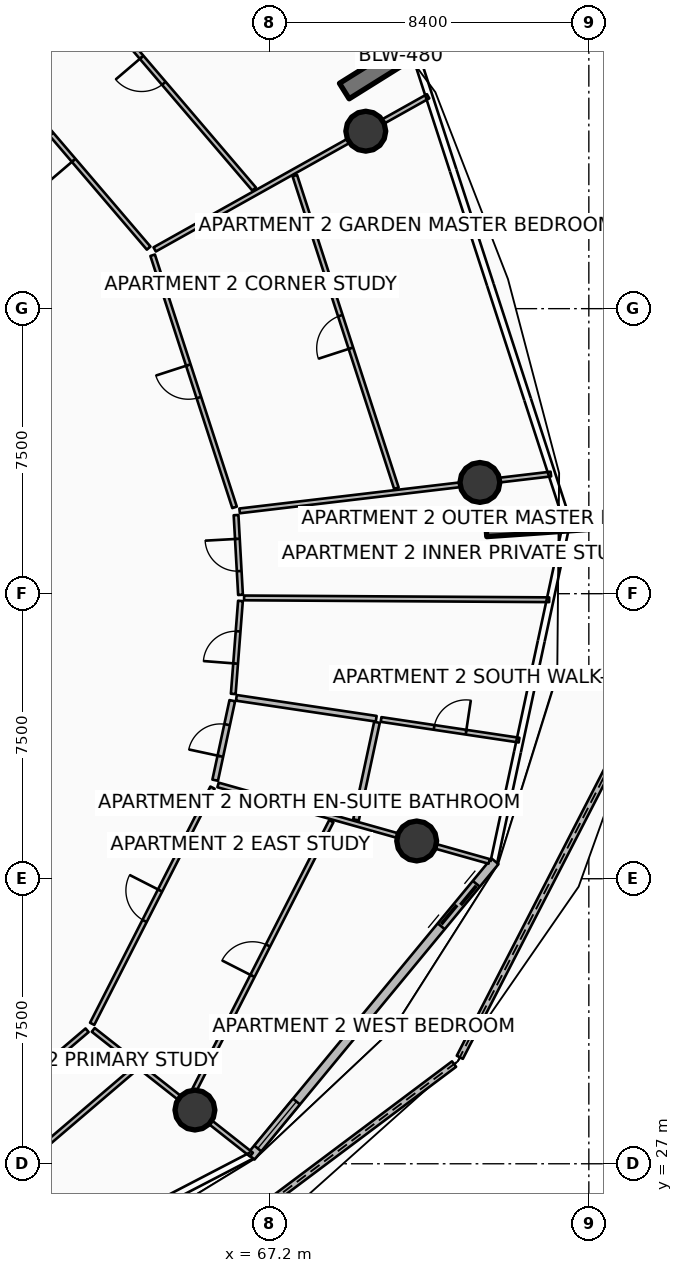
"""IFC4 building model, lengths in metres.
Left out: names, types, materials, properties, quantities, classifications, styles, units other than length and angle.
Written with IfcOpenShell. Run it as: python <this file> out.ifc"""

import sys

from ifc_helpers import new_model, si_unit, direction, frame, frame_2d, origin, origin_2d, place, context, subcontext, project, spatial, polyline, rectangle, circle, outline, extrude, element, fill, save


model = new_model("IFC4")
c1 = context("Model", 3, precision=1e-05, world=origin(), true_north=direction((0.0, 1.0)))
c2 = subcontext(c1, "Body", "Model", "MODEL_VIEW")
j1 = project(units=[si_unit("LENGTHUNIT", "METRE"), si_unit("PLANEANGLEUNIT", "RADIAN")], contexts=[c1])
p1 = place(None, origin())
s1 = spatial("IfcSite", under=j1, at=p1, CompositionType="ELEMENT")
p2 = place(p1, origin())
s2 = spatial("IfcBuilding", under=s1, at=p2, CompositionType="ELEMENT")
p3 = place(p2, frame((0.0, 0.0, 146.55)))
s3 = spatial("IfcBuildingStorey", under=s2, at=p3, CompositionType="ELEMENT", Elevation=146.55)
for number, where, z_axis, x_axis in (
    (1, (69.165, 55.226, 0.0), (0.0, 0.0, 1.0), (0.848, 0.53, 0.0)),
    (2, (72.897, 43.741, 0.0), (0.0, 0.0, 1.0), (0.998, 0.07, 0.0)),
):
    element("IfcWall", number, at=place(p3, frame(where, z_axis=z_axis, x_axis=x_axis)), inside=s3, PredefinedType="SOLIDWALL", context=c2, shape_type="SweptSolid", body=[
        extrude(rectangle(XDim=3.5, YDim=0.48, at=frame_2d((1.75, 0.0))), origin(), (0.0, 0.0, 1.0), 3.75),
    ])
for number, where, z_axis, x_axis in (
    (3, (69.73, 54.169, 0.0), (0.0, 0.0, 1.0), (1.0, 0.0, 0.0)),
    (4, (65.234, 28.414, 0.0), (0.0, 0.0, 1.0), (1.0, 0.0, 0.0)),
    (5, (71.07, 35.494, 0.0), (0.0, 0.0, 1.0), (1.0, 0.0, 0.0)),
    (6, (72.733, 44.927, 0.0), (0.0, 0.0, 1.0), (1.0, 0.0, 0.0)),
):
    element("IfcColumn", number, at=place(p3, frame(where, z_axis=z_axis, x_axis=x_axis)), inside=s3, PredefinedType="COLUMN", context=c2, shape_type="SweptSolid", body=[
        extrude(circle(Radius=0.525, at=origin_2d()), origin(), (0.0, 0.0, 1.0), 3.5),
    ])
p4 = place(p3, frame((63.954, 23.55, 0.0), z_axis=(0.0, 0.0, 1.0), x_axis=(0.800078127259, 0.599895816189, 0.0)))
e7 = element("IfcWall", 7, at=p4, inside=s3, PredefinedType="PARAPET", context=c2, shape_type="SweptSolid", body=[
    extrude(outline(polyline([(0.0, 0.0), (10.124, 0.0), (10.124, 1.348), (5.062, 1.182), (0.0, 1.12), (0.0, 0.0)])), frame((0.0, 0.09, 0.0), z_axis=(0.0, -1.0, 0.0), x_axis=(1.0, 0.0, 0.0)), (0.0, 0.0, 1.0), 0.18),
])
p5 = place(p3, frame((72.204, 29.802, 0.0), z_axis=(0.0, 0.0, 1.0), x_axis=(0.457378798552, 0.88927196888, 0.0)))
e8 = element("IfcWall", 8, at=p5, inside=s3, PredefinedType="PARAPET", context=c2, shape_type="SweptSolid", body=[
    extrude(outline(polyline([(0.0, 0.0), (10.93, 0.0), (10.93, 1.747), (5.465, 1.562), (0.0, 1.348), (0.0, 0.0)])), frame((0.0, 0.09, 0.0), z_axis=(0.0, -1.0, 0.0), x_axis=(1.0, 0.0, 0.0)), (0.0, 0.0, 1.0), 0.18),
])
p6 = place(p3, frame((66.709, 27.187, 0.0), z_axis=(0.0, 0.0, 1.0), x_axis=(0.636771922292, 0.77105221547, 0.0)))
e9 = element("IfcWall", 9, at=p6, inside=s3, PredefinedType="SOLIDWALL", context=c2, shape_type="SweptSolid", body=[
    extrude(rectangle(XDim=10.082, YDim=0.24, at=frame_2d((5.041, 0.0))), origin(), (0.0, 0.0, 1.0), 2.45),
])
p7 = place(p6, frame((7.862, 0.0, 0.0)))
e10 = element("IfcOpeningElement", 10, at=p7, cuts=e9, PredefinedType="OPENING", context=c2, shape_type="SweptSolid", body=[
    extrude(rectangle(XDim=1.45, YDim=2.15, at=frame_2d((0.725, 1.075))), frame((0.0, 0.13, 0.0), z_axis=(0.0, -1.0, 0.0), x_axis=(1.0, 0.0, 0.0)), (0.0, 0.0, 1.0), 0.26),
])
p8 = place(p6, frame((0.28, 0.0, 0.65)))
e11 = element("IfcOpeningElement", 11, at=p8, cuts=e9, PredefinedType="OPENING", context=c2, shape_type="SweptSolid", body=[
    extrude(rectangle(XDim=1.6, YDim=1.5, at=frame_2d((0.8, 0.75))), frame((0.0, 0.13, 0.0), z_axis=(0.0, -1.0, 0.0), x_axis=(1.0, 0.0, 0.0)), (0.0, 0.0, 1.0), 0.26),
])
p9 = place(p3, frame((57.093, 25.983, 0.0), z_axis=(0.0, 0.0, 1.0), x_axis=(0.76040680935, 0.649447060425, 0.0)))
e12 = element("IfcWall", 12, at=p9, inside=s3, PredefinedType="PARTITIONING", context=c2, shape_type="SweptSolid", body=[
    extrude(rectangle(XDim=6.975, YDim=0.125, at=frame_2d((3.487, 0.0))), origin(), (0.0, 0.0, 1.0), 2.94),
])
p10 = place(p9, frame((3.037, 0.0, 0.0)))
e13 = element("IfcOpeningElement", 13, at=p10, cuts=e12, PredefinedType="OPENING", context=c2, shape_type="SweptSolid", body=[
    extrude(rectangle(XDim=0.9, YDim=2.08, at=frame_2d((0.45, 1.04))), frame((0.0, 0.073, 0.0), z_axis=(0.0, -1.0, 0.0), x_axis=(1.0, 0.0, 0.0)), (0.0, 0.0, 1.0), 0.145),
])
p11 = place(p3, frame((57.882, 24.574, 0.0), z_axis=(0.0, 0.0, 1.0), x_axis=(0.760417937401, 0.649434030891, 0.0)))
e14 = element("IfcWall", 14, at=p11, inside=s3, PredefinedType="PARTITIONING", context=c2, shape_type="SweptSolid", body=[
    extrude(rectangle(XDim=7.605, YDim=0.125, at=frame_2d((3.802, 0.0))), origin(), (0.0, 0.0, 1.0), 2.94),
])
p12 = place(p11, frame((3.352, 0.0, 0.0)))
e15 = element("IfcOpeningElement", 15, at=p12, cuts=e14, PredefinedType="OPENING", context=c2, shape_type="SweptSolid", body=[
    extrude(rectangle(XDim=0.9, YDim=2.08, at=frame_2d((0.45, 1.04))), frame((0.0, 0.073, 0.0), z_axis=(0.0, -1.0, 0.0), x_axis=(1.0, 0.0, 0.0)), (0.0, 0.0, 1.0), 0.145),
])
p13 = place(p3, frame((62.559, 30.523, 0.0), z_axis=(0.0, 0.0, 1.0), x_axis=(0.785319981095, -0.619090080112, 0.0)))
e16 = element("IfcWall", 16, at=p13, inside=s3, PredefinedType="PARTITIONING", context=c2, shape_type="SweptSolid", body=[
    extrude(rectangle(XDim=5.301, YDim=0.125, at=frame_2d((2.65, 0.0))), origin(), (0.0, 0.0, 1.0), 2.94),
])
p14 = place(p3, frame((62.531, 30.683, 0.0), z_axis=(0.0, 0.0, 1.0), x_axis=(0.453977694262, 0.891013048789, 0.0)))
e17 = element("IfcWall", 17, at=p14, inside=s3, PredefinedType="PARTITIONING", context=c2, shape_type="SweptSolid", body=[
    extrude(rectangle(XDim=6.974, YDim=0.125, at=frame_2d((3.487, 0.0))), origin(), (0.0, 0.0, 1.0), 2.94),
])
p15 = place(p14, frame((3.037, 0.0, 0.0)))
e18 = element("IfcOpeningElement", 18, at=p15, cuts=e17, PredefinedType="OPENING", context=c2, shape_type="SweptSolid", body=[
    extrude(rectangle(XDim=0.9, YDim=2.08, at=frame_2d((0.45, 1.04))), frame((0.0, 0.073, 0.0), z_axis=(0.0, -1.0, 0.0), x_axis=(1.0, 0.0, 0.0)), (0.0, 0.0, 1.0), 0.145),
])
p16 = place(p3, frame((65.082, 28.671, 0.0), z_axis=(0.0, 0.0, 1.0), x_axis=(0.454001657521, 0.891000838927, 0.0)))
e19 = element("IfcWall", 19, at=p16, inside=s3, PredefinedType="PARTITIONING", context=c2, shape_type="SweptSolid", body=[
    extrude(rectangle(XDim=8.242, YDim=0.125, at=frame_2d((4.121, 0.0))), origin(), (0.0, 0.0, 1.0), 2.94),
])
p17 = place(p16, frame((3.671, 0.0, 0.0)))
e20 = element("IfcOpeningElement", 20, at=p17, cuts=e19, PredefinedType="OPENING", context=c2, shape_type="SweptSolid", body=[
    extrude(rectangle(XDim=0.9, YDim=2.08, at=frame_2d((0.45, 1.04))), frame((0.0, 0.073, 0.0), z_axis=(0.0, -1.0, 0.0), x_axis=(1.0, 0.0, 0.0)), (0.0, 0.0, 1.0), 0.145),
])
p18 = place(p3, frame((65.843, 36.968, 0.0), z_axis=(0.0, 0.0, 1.0), x_axis=(0.962456736489, -0.271435131084, 0.0)))
e21 = element("IfcWall", 21, at=p18, inside=s3, PredefinedType="PARTITIONING", context=c2, shape_type="SweptSolid", body=[
    extrude(rectangle(XDim=7.412, YDim=0.125, at=frame_2d((3.706, 0.0))), origin(), (0.0, 0.0, 1.0), 2.94),
])
p19 = place(p3, frame((65.768, 37.093, 0.0), z_axis=(0.0, 0.0, 1.0), x_axis=(0.210136736931, 0.977672006243, 0.0)))
e22 = element("IfcWall", 22, at=p19, inside=s3, PredefinedType="PARTITIONING", context=c2, shape_type="SweptSolid", body=[
    extrude(rectangle(XDim=2.14, YDim=0.15, at=frame_2d((1.07, 0.0))), origin(), (0.0, 0.0, 1.0), 2.94),
])
p20 = place(p19, frame((0.645, 0.0, 0.0)))
e23 = element("IfcOpeningElement", 23, at=p20, cuts=e22, PredefinedType="OPENING", context=c2, shape_type="SweptSolid", body=[
    extrude(rectangle(XDim=0.85, YDim=2.06, at=frame_2d((0.425, 1.03))), frame((0.0, 0.085, 0.0), z_axis=(0.0, -1.0, 0.0), x_axis=(1.0, 0.0, 0.0)), (0.0, 0.0, 1.0), 0.17),
])
p21 = place(p3, frame((69.473, 36.048, 0.0), z_axis=(0.0, 0.0, 1.0), x_axis=(0.210074988051, 0.97768527625, 0.0)))
e24 = element("IfcWall", 24, at=p21, inside=s3, PredefinedType="PARTITIONING", context=c2, shape_type="SweptSolid", body=[
    extrude(rectangle(XDim=2.626, YDim=0.15, at=frame_2d((1.313, 0.0))), origin(), (0.0, 0.0, 1.0), 2.94),
])
p22 = place(p3, frame((66.325, 39.26, 0.0), z_axis=(0.0, 0.0, 1.0), x_axis=(0.988998843182, -0.147923250997, 0.0)))
e25 = element("IfcWall", 25, at=p22, inside=s3, PredefinedType="PARTITIONING", context=c2, shape_type="SweptSolid", body=[
    extrude(rectangle(XDim=3.72, YDim=0.15, at=frame_2d((1.86, 0.0))), origin(), (0.0, 0.0, 1.0), 2.94),
])
p23 = place(p3, frame((70.133, 38.69, 0.0), z_axis=(0.0, 0.0, 1.0), x_axis=(0.989002592366, -0.147898182183, 0.0)))
e26 = element("IfcWall", 26, at=p23, inside=s3, PredefinedType="PARTITIONING", context=c2, shape_type="SweptSolid", body=[
    extrude(rectangle(XDim=3.671, YDim=0.125, at=frame_2d((1.835, 0.0))), origin(), (0.0, 0.0, 1.0), 2.94),
])
p24 = place(p23, frame((1.411, 0.0, 0.0)))
e27 = element("IfcOpeningElement", 27, at=p24, cuts=e26, PredefinedType="OPENING", context=c2, shape_type="SweptSolid", body=[
    extrude(rectangle(XDim=0.85, YDim=2.06, at=frame_2d((0.425, 1.03))), frame((0.0, 0.073, 0.0), z_axis=(0.0, -1.0, 0.0), x_axis=(1.0, 0.0, 0.0)), (0.0, 0.0, 1.0), 0.145),
])
p25 = place(p3, frame((66.529, 41.889, 0.0), z_axis=(0.0, 0.0, 1.0), x_axis=(0.999982052634, -0.00599119444, 0.0)))
e28 = element("IfcWall", 28, at=p25, inside=s3, PredefinedType="PARTITIONING", context=c2, shape_type="SweptSolid", body=[
    extrude(rectangle(XDim=8.028, YDim=0.125, at=frame_2d((4.014, 0.0))), origin(), (0.0, 0.0, 1.0), 2.94),
])
p26 = place(p3, frame((66.243, 39.363, 0.0), z_axis=(0.0, 0.0, 1.0), x_axis=(0.077198584258, 0.99701573638, 0.0)))
e29 = element("IfcWall", 29, at=p26, inside=s3, PredefinedType="PARTITIONING", context=c2, shape_type="SweptSolid", body=[
    extrude(rectangle(XDim=2.454, YDim=0.125, at=frame_2d((1.227, 0.0))), origin(), (0.0, 0.0, 1.0), 2.94),
])
p27 = place(p26, frame((0.802, 0.0, 0.0)))
e30 = element("IfcOpeningElement", 30, at=p27, cuts=e29, PredefinedType="OPENING", context=c2, shape_type="SweptSolid", body=[
    extrude(rectangle(XDim=0.85, YDim=2.06, at=frame_2d((0.425, 1.03))), frame((0.0, 0.073, 0.0), z_axis=(0.0, -1.0, 0.0), x_axis=(1.0, 0.0, 0.0)), (0.0, 0.0, 1.0), 0.145),
])
p28 = place(p3, frame((66.434, 41.969, 0.0), z_axis=(0.0, 0.0, 1.0), x_axis=(-0.055766005986, 0.998443865511, 0.0)))
e31 = element("IfcWall", 31, at=p28, inside=s3, PredefinedType="PARTITIONING", context=c2, shape_type="SweptSolid", body=[
    extrude(rectangle(XDim=2.101, YDim=0.125, at=frame_2d((1.051, 0.0))), origin(), (0.0, 0.0, 1.0), 2.94),
])
p29 = place(p28, frame((0.626, 0.0, 0.0)))
e32 = element("IfcOpeningElement", 32, at=p29, cuts=e31, PredefinedType="OPENING", context=c2, shape_type="SweptSolid", body=[
    extrude(rectangle(XDim=0.85, YDim=2.06, at=frame_2d((0.425, 1.03))), frame((0.0, 0.073, 0.0), z_axis=(0.0, -1.0, 0.0), x_axis=(1.0, 0.0, 0.0)), (0.0, 0.0, 1.0), 0.145),
])
p30 = place(p3, frame((66.41, 44.179, 0.0), z_axis=(0.0, 0.0, 1.0), x_axis=(0.993070354128, 0.117521367213, 0.0)))
e33 = element("IfcWall", 33, at=p30, inside=s3, PredefinedType="PARTITIONING", context=c2, shape_type="SweptSolid", body=[
    extrude(rectangle(XDim=8.247, YDim=0.125, at=frame_2d((4.124, 0.0))), origin(), (0.0, 0.0, 1.0), 2.94),
])
p31 = place(p3, frame((66.277, 44.272, 0.0), z_axis=(0.0, 0.0, 1.0), x_axis=(-0.308993461661, 0.951064162215, 0.0)))
e34 = element("IfcWall", 34, at=p31, inside=s3, PredefinedType="PARTITIONING", context=c2, shape_type="SweptSolid", body=[
    extrude(rectangle(XDim=6.974, YDim=0.125, at=frame_2d((3.487, 0.0))), origin(), (0.0, 0.0, 1.0), 2.94),
])
p32 = place(p31, frame((3.037, 0.0, 0.0)))
e35 = element("IfcOpeningElement", 35, at=p32, cuts=e34, PredefinedType="OPENING", context=c2, shape_type="SweptSolid", body=[
    extrude(rectangle(XDim=0.9, YDim=2.08, at=frame_2d((0.45, 1.04))), frame((0.0, 0.073, 0.0), z_axis=(0.0, -1.0, 0.0), x_axis=(1.0, 0.0, 0.0)), (0.0, 0.0, 1.0), 0.145),
])
p33 = place(p3, frame((70.535, 44.776, 0.0), z_axis=(0.0, 0.0, 1.0), x_axis=(-0.309002443549, 0.951061244022, 0.0)))
e36 = element("IfcWall", 36, at=p33, inside=s3, PredefinedType="PARTITIONING", context=c2, shape_type="SweptSolid", body=[
    extrude(rectangle(XDim=8.647, YDim=0.125, at=frame_2d((4.324, 0.0))), origin(), (0.0, 0.0, 1.0), 2.94),
])
p34 = place(p33, frame((3.874, 0.0, 0.0)))
e37 = element("IfcOpeningElement", 37, at=p34, cuts=e36, PredefinedType="OPENING", context=c2, shape_type="SweptSolid", body=[
    extrude(rectangle(XDim=0.9, YDim=2.08, at=frame_2d((0.45, 1.04))), frame((0.0, 0.073, 0.0), z_axis=(0.0, -1.0, 0.0), x_axis=(1.0, 0.0, 0.0)), (0.0, 0.0, 1.0), 0.145),
])
p35 = place(p3, frame((64.175, 51.059, 0.0), z_axis=(0.0, 0.0, 1.0), x_axis=(0.872491881101, 0.488628608877, 0.0)))
e38 = element("IfcWall", 38, at=p35, inside=s3, PredefinedType="PARTITIONING", context=c2, shape_type="SweptSolid", body=[
    extrude(rectangle(XDim=8.247, YDim=0.125, at=frame_2d((4.124, 0.0))), origin(), (0.0, 0.0, 1.0), 2.94),
])
p36 = place(p3, frame((64.017, 51.093, 0.0), z_axis=(0.0, 0.0, 1.0), x_axis=(-0.649447060425, 0.76040680935, 0.0)))
e39 = element("IfcWall", 39, at=p36, inside=s3, PredefinedType="PARTITIONING", context=c2, shape_type="SweptSolid", body=[
    extrude(rectangle(XDim=6.975, YDim=0.125, at=frame_2d((3.487, 0.0))), origin(), (0.0, 0.0, 1.0), 2.94),
])
p37 = place(p36, frame((3.037, 0.0, 0.0)))
e40 = element("IfcOpeningElement", 40, at=p37, cuts=e39, PredefinedType="OPENING", context=c2, shape_type="SweptSolid", body=[
    extrude(rectangle(XDim=0.9, YDim=2.08, at=frame_2d((0.45, 1.04))), frame((0.0, 0.073, 0.0), z_axis=(0.0, -1.0, 0.0), x_axis=(1.0, 0.0, 0.0)), (0.0, 0.0, 1.0), 0.145),
])
p38 = place(p3, frame((66.792, 52.648, 0.0), z_axis=(0.0, 0.0, 1.0), x_axis=(-0.649446834215, 0.76040700255, 0.0)))
e41 = element("IfcWall", 41, at=p38, inside=s3, PredefinedType="PARTITIONING", context=c2, shape_type="SweptSolid", body=[
    extrude(rectangle(XDim=8.216, YDim=0.125, at=frame_2d((4.108, 0.0))), origin(), (0.0, 0.0, 1.0), 2.94),
])
p39 = place(p38, frame((3.658, 0.0, 0.0)))
e42 = element("IfcOpeningElement", 42, at=p39, cuts=e41, PredefinedType="OPENING", context=c2, shape_type="SweptSolid", body=[
    extrude(rectangle(XDim=0.9, YDim=2.08, at=frame_2d((0.45, 1.04))), frame((0.0, 0.073, 0.0), z_axis=(0.0, -1.0, 0.0), x_axis=(1.0, 0.0, 0.0)), (0.0, 0.0, 1.0), 0.145),
])
p40 = place(p7, origin())
e43 = element("IfcDoor", 43, at=p40, inside=s3, OperationType="DOUBLE_DOOR_SLIDING", PredefinedType="DOOR", context=c2, shape_type="SweptSolid", body=[
    extrude(rectangle(XDim=1.45, YDim=2.15, at=frame_2d((0.725, 1.075))), frame((0.0, 0.025, 0.0), z_axis=(0.0, -1.0, 0.0), x_axis=(1.0, 0.0, 0.0)), (0.0, 0.0, 1.0), 0.05),
])
fill(e10, e43)
p41 = place(p8, origin())
e44 = element("IfcWindow", 44, at=p41, inside=s3, PartitioningType="SINGLE_PANEL", PredefinedType="WINDOW", context=c2, shape_type="SweptSolid", body=[
    extrude(rectangle(XDim=1.6, YDim=1.5, at=frame_2d((0.8, 0.75))), frame((0.0, 0.03, 0.0), z_axis=(0.0, -1.0, 0.0), x_axis=(1.0, 0.0, 0.0)), (0.0, 0.0, 1.0), 0.06),
])
fill(e11, e44)
p42 = place(p15, origin())
e45 = element("IfcDoor", 45, at=p42, inside=s3, OperationType="SINGLE_SWING_RIGHT", PredefinedType="DOOR", context=c2, shape_type="SweptSolid", body=[
    extrude(rectangle(XDim=0.9, YDim=2.08, at=frame_2d((0.45, 1.04))), frame((0.0, 0.025, 0.0), z_axis=(0.0, -1.0, 0.0), x_axis=(1.0, 0.0, 0.0)), (0.0, 0.0, 1.0), 0.05),
])
fill(e18, e45)
p43 = place(p17, origin())
e46 = element("IfcDoor", 46, at=p43, inside=s3, OperationType="SINGLE_SWING_LEFT", PredefinedType="DOOR", context=c2, shape_type="SweptSolid", body=[
    extrude(rectangle(XDim=0.9, YDim=2.08, at=frame_2d((0.45, 1.04))), frame((0.0, 0.025, 0.0), z_axis=(0.0, -1.0, 0.0), x_axis=(1.0, 0.0, 0.0)), (0.0, 0.0, 1.0), 0.05),
])
fill(e20, e46)
p44 = place(p20, origin())
e47 = element("IfcDoor", 47, at=p44, inside=s3, OperationType="SINGLE_SWING_LEFT", PredefinedType="DOOR", context=c2, shape_type="SweptSolid", body=[
    extrude(rectangle(XDim=0.85, YDim=2.06, at=frame_2d((0.425, 1.03))), frame((0.0, 0.025, 0.0), z_axis=(0.0, -1.0, 0.0), x_axis=(1.0, 0.0, 0.0)), (0.0, 0.0, 1.0), 0.05),
])
fill(e23, e47)
p45 = place(p24, origin())
e48 = element("IfcDoor", 48, at=p45, inside=s3, OperationType="SINGLE_SWING_RIGHT", PredefinedType="DOOR", context=c2, shape_type="SweptSolid", body=[
    extrude(rectangle(XDim=0.85, YDim=2.06, at=frame_2d((0.425, 1.03))), frame((0.0, 0.025, 0.0), z_axis=(0.0, -1.0, 0.0), x_axis=(1.0, 0.0, 0.0)), (0.0, 0.0, 1.0), 0.05),
])
fill(e27, e48)
p46 = place(p27, origin())
e49 = element("IfcDoor", 49, at=p46, inside=s3, OperationType="SINGLE_SWING_LEFT", PredefinedType="DOOR", context=c2, shape_type="SweptSolid", body=[
    extrude(rectangle(XDim=0.85, YDim=2.06, at=frame_2d((0.425, 1.03))), frame((0.0, 0.025, 0.0), z_axis=(0.0, -1.0, 0.0), x_axis=(1.0, 0.0, 0.0)), (0.0, 0.0, 1.0), 0.05),
])
fill(e30, e49)
p47 = place(p29, origin())
e50 = element("IfcDoor", 50, at=p47, inside=s3, OperationType="SINGLE_SWING_RIGHT", PredefinedType="DOOR", context=c2, shape_type="SweptSolid", body=[
    extrude(rectangle(XDim=0.85, YDim=2.06, at=frame_2d((0.425, 1.03))), frame((0.0, 0.025, 0.0), z_axis=(0.0, -1.0, 0.0), x_axis=(1.0, 0.0, 0.0)), (0.0, 0.0, 1.0), 0.05),
])
fill(e32, e50)
p48 = place(p32, origin())
e51 = element("IfcDoor", 51, at=p48, inside=s3, OperationType="SINGLE_SWING_RIGHT", PredefinedType="DOOR", context=c2, shape_type="SweptSolid", body=[
    extrude(rectangle(XDim=0.9, YDim=2.08, at=frame_2d((0.45, 1.04))), frame((0.0, 0.025, 0.0), z_axis=(0.0, -1.0, 0.0), x_axis=(1.0, 0.0, 0.0)), (0.0, 0.0, 1.0), 0.05),
])
fill(e35, e51)
p49 = place(p34, origin())
e52 = element("IfcDoor", 52, at=p49, inside=s3, OperationType="SINGLE_SWING_LEFT", PredefinedType="DOOR", context=c2, shape_type="SweptSolid", body=[
    extrude(rectangle(XDim=0.9, YDim=2.08, at=frame_2d((0.45, 1.04))), frame((0.0, 0.025, 0.0), z_axis=(0.0, -1.0, 0.0), x_axis=(1.0, 0.0, 0.0)), (0.0, 0.0, 1.0), 0.05),
])
fill(e37, e52)
p50 = place(p37, origin())
e53 = element("IfcDoor", 53, at=p50, inside=s3, OperationType="SINGLE_SWING_LEFT", PredefinedType="DOOR", context=c2, shape_type="SweptSolid", body=[
    extrude(rectangle(XDim=0.9, YDim=2.08, at=frame_2d((0.45, 1.04))), frame((0.0, 0.025, 0.0), z_axis=(0.0, -1.0, 0.0), x_axis=(1.0, 0.0, 0.0)), (0.0, 0.0, 1.0), 0.05),
])
fill(e40, e53)
p51 = place(p39, origin())
e54 = element("IfcDoor", 54, at=p51, inside=s3, OperationType="SINGLE_SWING_RIGHT", PredefinedType="DOOR", context=c2, shape_type="SweptSolid", body=[
    extrude(rectangle(XDim=0.9, YDim=2.08, at=frame_2d((0.45, 1.04))), frame((0.0, 0.025, 0.0), z_axis=(0.0, -1.0, 0.0), x_axis=(1.0, 0.0, 0.0)), (0.0, 0.0, 1.0), 0.05),
])
fill(e42, e54)
save(model, sys.argv[1])
